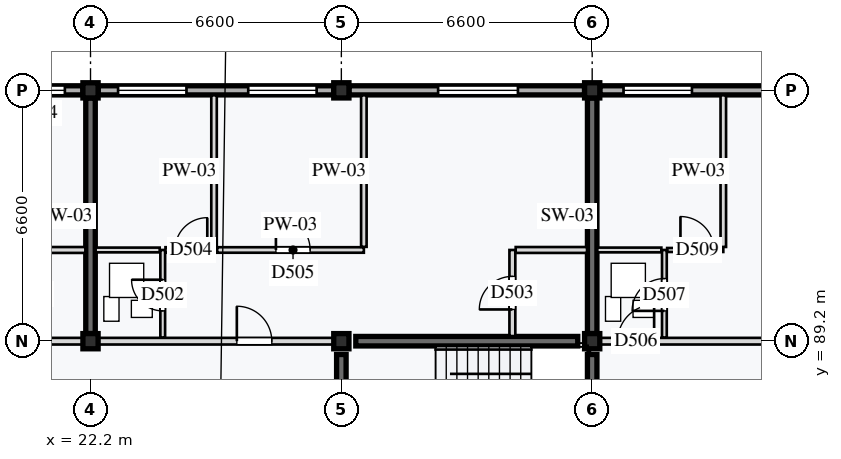
"""IFC4 building model, lengths in metres.
Left out: names, types, materials, properties, quantities, classifications, styles, units other than length and angle.
Written with IfcOpenShell. Run it as: python <this file> out.ifc"""

import sys

from ifc_helpers import new_model, si_unit, direction, frame, frame_2d, origin, origin_2d, place, context, subcontext, project, spatial, rectangle, extrude, element, fill, save


model = new_model("IFC4")
c1 = context("Model", 3, precision=1e-05, world=origin(), true_north=direction((0.0, 1.0)))
c2 = subcontext(c1, "Body", "Model", "MODEL_VIEW")
j1 = project(units=[si_unit("LENGTHUNIT", "METRE"), si_unit("PLANEANGLEUNIT", "RADIAN")], contexts=[c1])
p1 = place(None, origin())
s1 = spatial("IfcSite", under=j1, at=p1, CompositionType="ELEMENT")
p2 = place(p1, origin())
s2 = spatial("IfcBuilding", under=s1, at=p2, CompositionType="ELEMENT")
p3 = place(p2, frame((0.0, 0.0, 50.0)))
s3 = spatial("IfcBuildingStorey", under=s2, at=p3, CompositionType="ELEMENT", Elevation=50.0)
for number, where, z_axis, x_axis in (
    (1, (22.2, 89.2, 0.0), (0.0, 0.0, 1.0), (1.0, 0.0, 0.0)),
    (2, (22.2, 95.8, 0.0), (0.0, 0.0, 1.0), (1.0, 0.0, 0.0)),
    (3, (28.8, 89.2, 0.0), (0.0, 0.0, 1.0), (1.0, 0.0, 0.0)),
    (4, (28.8, 95.8, 0.0), (0.0, 0.0, 1.0), (1.0, 0.0, 0.0)),
    (5, (35.4, 89.2, 0.0), (0.0, 0.0, 1.0), (1.0, 0.0, 0.0)),
    (6, (35.4, 95.8, 0.0), (0.0, 0.0, 1.0), (1.0, 0.0, 0.0)),
):
    element("IfcColumn", number, at=place(p3, frame(where, z_axis=z_axis, x_axis=x_axis)), inside=s3, PredefinedType="COLUMN", context=c2, shape_type="SweptSolid", body=[
        extrude(rectangle(XDim=0.4, YDim=0.4, at=origin_2d()), origin(), (0.0, 0.0, 1.0), 3.2),
    ])
p4 = place(p3, frame((29.18, 89.2, 0.0), z_axis=(0.0, 0.0, 1.0), x_axis=(1.0, 0.0, 0.0)))
e7 = element("IfcWall", 7, at=p4, inside=s3, PredefinedType="SHEAR", context=c2, shape_type="SweptSolid", body=[
    extrude(rectangle(XDim=5.84, YDim=0.25, at=frame_2d((2.92, 0.0))), origin(), (0.0, 0.0, 1.0), 2.98),
])
for number, where, z_axis, x_axis in (
    (8, (28.8, 86.05, 0.0), (0.0, 0.0, 1.0), (0.0, 1.0, 0.0)),
    (9, (35.4, 86.05, 0.0), (0.0, 0.0, 1.0), (0.0, 1.0, 0.0)),
):
    element("IfcWall", number, at=place(p3, frame(where, z_axis=z_axis, x_axis=x_axis)), inside=s3, PredefinedType="SHEAR", context=c2, shape_type="SweptSolid", body=[
        extrude(rectangle(XDim=2.8, YDim=0.25, at=frame_2d((1.4, 0.0))), origin(), (0.0, 0.0, 1.0), 2.98),
    ])
for number, where, z_axis, x_axis in (
    (10, (22.2, 89.4, 0.0), (0.0, 0.0, 1.0), (0.0, 1.0, 0.0)),
    (11, (35.4, 89.4, 0.0), (0.0, 0.0, 1.0), (0.0, 1.0, 0.0)),
):
    element("IfcWall", number, at=place(p3, frame(where, z_axis=z_axis, x_axis=x_axis)), inside=s3, PredefinedType="SHEAR", context=c2, shape_type="SweptSolid", body=[
        extrude(rectangle(XDim=6.2, YDim=0.25, at=frame_2d((3.1, 0.0))), origin(), (0.0, 0.0, 1.0), 2.98),
    ])
p5 = place(p3, frame((15.8, 95.8, 0.0), z_axis=(0.0, 0.0, 1.0), x_axis=(1.0, 0.0, 0.0)))
e12 = element("IfcWall", 12, at=p5, inside=s3, PredefinedType="STANDARD", context=c2, shape_type="SweptSolid", body=[
    extrude(rectangle(XDim=6.2, YDim=0.24, at=frame_2d((3.1, 0.0))), origin(), (0.0, 0.0, 1.0), 2.6),
])
p6 = place(p5, frame((0.625, 0.0, 0.85)))
e13 = element("IfcOpeningElement", 13, at=p6, cuts=e12, PredefinedType="OPENING", context=c2, shape_type="SweptSolid", body=[
    extrude(rectangle(XDim=1.8, YDim=1.35, at=frame_2d((0.9, 0.675))), frame((0.0, 0.13, 0.0), z_axis=(0.0, -1.0, 0.0), x_axis=(1.0, 0.0, 0.0)), (0.0, 0.0, 1.0), 0.26),
])
p7 = place(p5, frame((3.925, 0.0, 0.85)))
e14 = element("IfcOpeningElement", 14, at=p7, cuts=e12, PredefinedType="OPENING", context=c2, shape_type="SweptSolid", body=[
    extrude(rectangle(XDim=1.8, YDim=1.55, at=frame_2d((0.9, 0.775))), frame((0.0, 0.13, 0.0), z_axis=(0.0, -1.0, 0.0), x_axis=(1.0, 0.0, 0.0)), (0.0, 0.0, 1.0), 0.26),
])
p8 = place(p3, frame((22.4, 95.8, 0.0), z_axis=(0.0, 0.0, 1.0), x_axis=(1.0, 0.0, 0.0)))
e15 = element("IfcWall", 15, at=p8, inside=s3, PredefinedType="STANDARD", context=c2, shape_type="SweptSolid", body=[
    extrude(rectangle(XDim=6.2, YDim=0.24, at=frame_2d((3.1, 0.0))), origin(), (0.0, 0.0, 1.0), 2.6),
])
p9 = place(p8, frame((0.525, 0.0, 0.85)))
e16 = element("IfcOpeningElement", 16, at=p9, cuts=e15, PredefinedType="OPENING", context=c2, shape_type="SweptSolid", body=[
    extrude(rectangle(XDim=1.8, YDim=1.35, at=frame_2d((0.9, 0.675))), frame((0.0, 0.13, 0.0), z_axis=(0.0, -1.0, 0.0), x_axis=(1.0, 0.0, 0.0)), (0.0, 0.0, 1.0), 0.26),
])
p10 = place(p8, frame((3.95, 0.0, 0.85)))
e17 = element("IfcOpeningElement", 17, at=p10, cuts=e15, PredefinedType="OPENING", context=c2, shape_type="SweptSolid", body=[
    extrude(rectangle(XDim=1.8, YDim=1.35, at=frame_2d((0.9, 0.675))), frame((0.0, 0.13, 0.0), z_axis=(0.0, -1.0, 0.0), x_axis=(1.0, 0.0, 0.0)), (0.0, 0.0, 1.0), 0.26),
])
p11 = place(p3, frame((29.0, 95.8, 0.0), z_axis=(0.0, 0.0, 1.0), x_axis=(1.0, 0.0, 0.0)))
e18 = element("IfcWall", 18, at=p11, inside=s3, PredefinedType="STANDARD", context=c2, shape_type="SweptSolid", body=[
    extrude(rectangle(XDim=6.2, YDim=0.24, at=frame_2d((3.1, 0.0))), origin(), (0.0, 0.0, 1.0), 2.6),
])
p12 = place(p11, frame((2.346, 0.0, 0.85)))
e19 = element("IfcOpeningElement", 19, at=p12, cuts=e18, PredefinedType="OPENING", context=c2, shape_type="SweptSolid", body=[
    extrude(rectangle(XDim=2.1, YDim=1.55, at=frame_2d((1.05, 0.775))), frame((0.0, 0.13, 0.0), z_axis=(0.0, -1.0, 0.0), x_axis=(1.0, 0.0, 0.0)), (0.0, 0.0, 1.0), 0.26),
])
p13 = place(p3, frame((35.6, 95.8, 0.0), z_axis=(0.0, 0.0, 1.0), x_axis=(1.0, 0.0, 0.0)))
e20 = element("IfcWall", 20, at=p13, inside=s3, PredefinedType="STANDARD", context=c2, shape_type="SweptSolid", body=[
    extrude(rectangle(XDim=6.2, YDim=0.24, at=frame_2d((3.1, 0.0))), origin(), (0.0, 0.0, 1.0), 2.6),
])
p14 = place(p13, frame((0.625, 0.0, 0.85)))
e21 = element("IfcOpeningElement", 21, at=p14, cuts=e20, PredefinedType="OPENING", context=c2, shape_type="SweptSolid", body=[
    extrude(rectangle(XDim=1.8, YDim=1.35, at=frame_2d((0.9, 0.675))), frame((0.0, 0.13, 0.0), z_axis=(0.0, -1.0, 0.0), x_axis=(1.0, 0.0, 0.0)), (0.0, 0.0, 1.0), 0.26),
])
p15 = place(p3, frame((19.2, 89.2, 0.0), z_axis=(0.0, 0.0, 1.0), x_axis=(1.0, 0.0, 0.0)))
e22 = element("IfcWall", 22, at=p15, inside=s3, PredefinedType="PARTITIONING", context=c2, shape_type="SweptSolid", body=[
    extrude(rectangle(XDim=3.0, YDim=0.175, at=frame_2d((1.5, 0.0))), origin(), (0.0, 0.0, 1.0), 2.55),
])
p16 = place(p15, frame((0.22, 0.0, 0.0)))
e23 = element("IfcOpeningElement", 23, at=p16, cuts=e22, PredefinedType="OPENING", context=c2, shape_type="SweptSolid", body=[
    extrude(rectangle(XDim=0.92, YDim=2.14, at=frame_2d((0.46, 1.07))), frame((0.0, 0.097, 0.0), z_axis=(0.0, -1.0, 0.0), x_axis=(1.0, 0.0, 0.0)), (0.0, 0.0, 1.0), 0.195),
])
p17 = place(p3, frame((20.688, 91.6, 0.0), z_axis=(0.0, 0.0, 1.0), x_axis=(1.0, 0.0, 0.0)))
e24 = element("IfcWall", 24, at=p17, inside=s3, PredefinedType="PARTITIONING", context=c2, shape_type="SweptSolid", body=[
    extrude(rectangle(XDim=1.377, YDim=0.155, at=frame_2d((0.689, 0.0))), origin(), (0.0, 0.0, 1.0), 2.98),
])
p18 = place(p3, frame((22.2, 89.2, 0.0), z_axis=(0.0, 0.0, 1.0), x_axis=(1.0, 0.0, 0.0)))
e25 = element("IfcWall", 25, at=p18, inside=s3, PredefinedType="PARTITIONING", context=c2, shape_type="SweptSolid", body=[
    extrude(rectangle(XDim=6.6, YDim=0.175, at=frame_2d((3.3, 0.0))), origin(), (0.0, 0.0, 1.0), 2.55),
])
p19 = place(p18, frame((3.85, 0.0, 0.0)))
e26 = element("IfcOpeningElement", 26, at=p19, cuts=e25, PredefinedType="OPENING", context=c2, shape_type="SweptSolid", body=[
    extrude(rectangle(XDim=0.92, YDim=2.14, at=frame_2d((0.46, 1.07))), frame((0.0, 0.097, 0.0), z_axis=(0.0, -1.0, 0.0), x_axis=(1.0, 0.0, 0.0)), (0.0, 0.0, 1.0), 0.195),
])
p20 = place(p3, frame((24.1, 89.298, 0.0), z_axis=(0.0, 0.0, 1.0), x_axis=(0.0, 1.0, 0.0)))
e27 = element("IfcWall", 27, at=p20, inside=s3, PredefinedType="PARTITIONING", context=c2, shape_type="SweptSolid", body=[
    extrude(rectangle(XDim=2.302, YDim=0.125, at=frame_2d((1.151, 0.0))), origin(), (0.0, 0.0, 1.0), 2.98),
])
p21 = place(p20, frame((0.7, 0.0, 0.0)))
e28 = element("IfcOpeningElement", 28, at=p21, cuts=e27, PredefinedType="OPENING", context=c2, shape_type="SweptSolid", body=[
    extrude(rectangle(XDim=0.82, YDim=2.05, at=frame_2d((0.41, 1.025))), frame((0.0, 0.073, 0.0), z_axis=(0.0, -1.0, 0.0), x_axis=(1.0, 0.0, 0.0)), (0.0, 0.0, 1.0), 0.145),
])
p22 = place(p3, frame((22.335, 91.6, 0.0), z_axis=(0.0, 0.0, 1.0), x_axis=(1.0, 0.0, 0.0)))
e29 = element("IfcWall", 29, at=p22, inside=s3, PredefinedType="PARTITIONING", context=c2, shape_type="SweptSolid", body=[
    extrude(rectangle(XDim=1.685, YDim=0.125, at=frame_2d((0.843, 0.0))), origin(), (0.0, 0.0, 1.0), 2.98),
])
p23 = place(p3, frame((33.3, 89.335, 0.0), z_axis=(0.0, 0.0, 1.0), x_axis=(0.0, 1.0, 0.0)))
e30 = element("IfcWall", 30, at=p23, inside=s3, PredefinedType="PARTITIONING", context=c2, shape_type="SweptSolid", body=[
    extrude(rectangle(XDim=2.265, YDim=0.155, at=frame_2d((1.133, 0.0))), origin(), (0.0, 0.0, 1.0), 2.98),
])
p24 = place(p23, frame((0.7, 0.0, 0.0)))
e31 = element("IfcOpeningElement", 31, at=p24, cuts=e30, PredefinedType="OPENING", context=c2, shape_type="SweptSolid", body=[
    extrude(rectangle(XDim=0.87, YDim=2.08, at=frame_2d((0.435, 1.04))), frame((0.0, 0.087, 0.0), z_axis=(0.0, -1.0, 0.0), x_axis=(1.0, 0.0, 0.0)), (0.0, 0.0, 1.0), 0.175),
])
p25 = place(p3, frame((33.387, 91.6, 0.0), z_axis=(0.0, 0.0, 1.0), x_axis=(1.0, 0.0, 0.0)))
e32 = element("IfcWall", 32, at=p25, inside=s3, PredefinedType="PARTITIONING", context=c2, shape_type="SweptSolid", body=[
    extrude(rectangle(XDim=1.877, YDim=0.155, at=frame_2d((0.939, 0.0))), origin(), (0.0, 0.0, 1.0), 2.98),
])
p26 = place(p3, frame((24.173, 91.6, 0.0), z_axis=(0.0, 0.0, 1.0), x_axis=(1.0, 0.0, 0.0)))
e33 = element("IfcWall", 33, at=p26, inside=s3, PredefinedType="PARTITIONING", context=c2, shape_type="SweptSolid", body=[
    extrude(rectangle(XDim=1.277, YDim=0.145, at=frame_2d((0.639, 0.0))), origin(), (0.0, 0.0, 1.0), 2.98),
])
p27 = place(p26, frame((0.25, 0.0, 0.0)))
e34 = element("IfcOpeningElement", 34, at=p27, cuts=e33, PredefinedType="OPENING", context=c2, shape_type="SweptSolid", body=[
    extrude(rectangle(XDim=0.85, YDim=2.1, at=frame_2d((0.425, 1.05))), frame((0.0, 0.083, 0.0), z_axis=(0.0, -1.0, 0.0), x_axis=(1.0, 0.0, 0.0)), (0.0, 0.0, 1.0), 0.165),
])
p28 = place(p3, frame((25.45, 91.683, 0.0), z_axis=(0.0, 0.0, 1.0), x_axis=(0.0, 1.0, 0.0)))
e35 = element("IfcWall", 35, at=p28, inside=s3, PredefinedType="PARTITIONING", context=c2, shape_type="SweptSolid", body=[
    extrude(rectangle(XDim=3.987, YDim=0.145, at=frame_2d((1.994, 0.0))), origin(), (0.0, 0.0, 1.0), 2.98),
])
p29 = place(p3, frame((25.532, 91.6, 0.0), z_axis=(0.0, 0.0, 1.0), x_axis=(1.0, 0.0, 0.0)))
e36 = element("IfcWall", 36, at=p29, inside=s3, PredefinedType="PARTITIONING", context=c2, shape_type="SweptSolid", body=[
    extrude(rectangle(XDim=3.86, YDim=0.145, at=frame_2d((1.93, 0.0))), origin(), (0.0, 0.0, 1.0), 2.98),
])
p30 = place(p29, frame((1.546, 0.0, 0.0)))
e37 = element("IfcOpeningElement", 37, at=p30, cuts=e36, PredefinedType="OPENING", context=c2, shape_type="SweptSolid", body=[
    extrude(rectangle(XDim=0.9, YDim=2.1, at=frame_2d((0.45, 1.05))), frame((0.0, 0.083, 0.0), z_axis=(0.0, -1.0, 0.0), x_axis=(1.0, 0.0, 0.0)), (0.0, 0.0, 1.0), 0.165),
])
p31 = place(p3, frame((29.392, 91.683, 0.0), z_axis=(0.0, 0.0, 1.0), x_axis=(0.0, 1.0, 0.0)))
e38 = element("IfcWall", 38, at=p31, inside=s3, PredefinedType="PARTITIONING", context=c2, shape_type="SweptSolid", body=[
    extrude(rectangle(XDim=3.987, YDim=0.145, at=frame_2d((1.994, 0.0))), origin(), (0.0, 0.0, 1.0), 2.98),
])
p32 = place(p3, frame((35.4, 89.2, 0.0), z_axis=(0.0, 0.0, 1.0), x_axis=(1.0, 0.0, 0.0)))
e39 = element("IfcWall", 39, at=p32, inside=s3, PredefinedType="PARTITIONING", context=c2, shape_type="SweptSolid", body=[
    extrude(rectangle(XDim=13.2, YDim=0.175, at=frame_2d((6.6, 0.0))), origin(), (0.0, 0.0, 1.0), 2.55),
])
p33 = place(p32, frame((0.67, 0.0, 0.0)))
e40 = element("IfcOpeningElement", 40, at=p33, cuts=e39, PredefinedType="OPENING", context=c2, shape_type="SweptSolid", body=[
    extrude(rectangle(XDim=0.96, YDim=2.18, at=frame_2d((0.48, 1.09))), frame((0.0, 0.097, 0.0), z_axis=(0.0, -1.0, 0.0), x_axis=(1.0, 0.0, 0.0)), (0.0, 0.0, 1.0), 0.195),
])
p34 = place(p3, frame((37.3, 89.298, 0.0), z_axis=(0.0, 0.0, 1.0), x_axis=(0.0, 1.0, 0.0)))
e41 = element("IfcWall", 41, at=p34, inside=s3, PredefinedType="PARTITIONING", context=c2, shape_type="SweptSolid", body=[
    extrude(rectangle(XDim=2.302, YDim=0.125, at=frame_2d((1.151, 0.0))), origin(), (0.0, 0.0, 1.0), 2.98),
])
p35 = place(p34, frame((0.7, 0.0, 0.0)))
e42 = element("IfcOpeningElement", 42, at=p35, cuts=e41, PredefinedType="OPENING", context=c2, shape_type="SweptSolid", body=[
    extrude(rectangle(XDim=0.85, YDim=2.04, at=frame_2d((0.425, 1.02))), frame((0.0, 0.073, 0.0), z_axis=(0.0, -1.0, 0.0), x_axis=(1.0, 0.0, 0.0)), (0.0, 0.0, 1.0), 0.145),
])
p36 = place(p3, frame((35.535, 91.6, 0.0), z_axis=(0.0, 0.0, 1.0), x_axis=(1.0, 0.0, 0.0)))
e43 = element("IfcWall", 43, at=p36, inside=s3, PredefinedType="PARTITIONING", context=c2, shape_type="SweptSolid", body=[
    extrude(rectangle(XDim=1.685, YDim=0.125, at=frame_2d((0.843, 0.0))), origin(), (0.0, 0.0, 1.0), 2.98),
])
p37 = place(p3, frame((37.373, 91.6, 0.0), z_axis=(0.0, 0.0, 1.0), x_axis=(1.0, 0.0, 0.0)))
e44 = element("IfcWall", 44, at=p37, inside=s3, PredefinedType="PARTITIONING", context=c2, shape_type="SweptSolid", body=[
    extrude(rectangle(XDim=1.478, YDim=0.105, at=frame_2d((0.739, 0.0))), origin(), (0.0, 0.0, 1.0), 2.98),
])
p38 = place(p37, frame((0.35, 0.0, 0.0)))
e45 = element("IfcOpeningElement", 45, at=p38, cuts=e44, PredefinedType="OPENING", context=c2, shape_type="SweptSolid", body=[
    extrude(rectangle(XDim=0.88, YDim=2.16, at=frame_2d((0.44, 1.08))), frame((0.0, 0.062, 0.0), z_axis=(0.0, -1.0, 0.0), x_axis=(1.0, 0.0, 0.0)), (0.0, 0.0, 1.0), 0.125),
])
p39 = place(p3, frame((38.85, 91.68, 0.0), z_axis=(0.0, 0.0, 1.0), x_axis=(0.0, 1.0, 0.0)))
e46 = element("IfcWall", 46, at=p39, inside=s3, PredefinedType="PARTITIONING", context=c2, shape_type="SweptSolid", body=[
    extrude(rectangle(XDim=3.99, YDim=0.145, at=frame_2d((1.995, 0.0))), origin(), (0.0, 0.0, 1.0), 2.98),
])
p40 = place(p7, origin())
e47 = element("IfcWindow", 47, at=p40, inside=s3, PartitioningType="SINGLE_PANEL", PredefinedType="WINDOW", context=c2, shape_type="SweptSolid", body=[
    extrude(rectangle(XDim=1.8, YDim=1.55, at=frame_2d((0.9, 0.775))), frame((0.0, 0.03, 0.0), z_axis=(0.0, -1.0, 0.0), x_axis=(1.0, 0.0, 0.0)), (0.0, 0.0, 1.0), 0.06),
])
fill(e14, e47)
p41 = place(p9, origin())
e48 = element("IfcWindow", 48, at=p41, inside=s3, PartitioningType="SINGLE_PANEL", PredefinedType="WINDOW", context=c2, shape_type="SweptSolid", body=[
    extrude(rectangle(XDim=1.8, YDim=1.35, at=frame_2d((0.9, 0.675))), frame((0.0, 0.03, 0.0), z_axis=(0.0, -1.0, 0.0), x_axis=(1.0, 0.0, 0.0)), (0.0, 0.0, 1.0), 0.06),
])
fill(e16, e48)
p42 = place(p10, origin())
e49 = element("IfcWindow", 49, at=p42, inside=s3, PartitioningType="SINGLE_PANEL", PredefinedType="WINDOW", context=c2, shape_type="SweptSolid", body=[
    extrude(rectangle(XDim=1.8, YDim=1.35, at=frame_2d((0.9, 0.675))), frame((0.0, 0.03, 0.0), z_axis=(0.0, -1.0, 0.0), x_axis=(1.0, 0.0, 0.0)), (0.0, 0.0, 1.0), 0.06),
])
fill(e17, e49)
p43 = place(p12, origin())
e50 = element("IfcWindow", 50, at=p43, inside=s3, PartitioningType="SINGLE_PANEL", PredefinedType="WINDOW", context=c2, shape_type="SweptSolid", body=[
    extrude(rectangle(XDim=2.1, YDim=1.55, at=frame_2d((1.05, 0.775))), frame((0.0, 0.03, 0.0), z_axis=(0.0, -1.0, 0.0), x_axis=(1.0, 0.0, 0.0)), (0.0, 0.0, 1.0), 0.06),
])
fill(e19, e50)
p44 = place(p14, origin())
e51 = element("IfcWindow", 51, at=p44, inside=s3, PartitioningType="SINGLE_PANEL", PredefinedType="WINDOW", context=c2, shape_type="SweptSolid", body=[
    extrude(rectangle(XDim=1.8, YDim=1.35, at=frame_2d((0.9, 0.675))), frame((0.0, 0.03, 0.0), z_axis=(0.0, -1.0, 0.0), x_axis=(1.0, 0.0, 0.0)), (0.0, 0.0, 1.0), 0.06),
])
fill(e21, e51)
p45 = place(p19, origin())
e52 = element("IfcDoor", 52, at=p45, inside=s3, OperationType="SINGLE_SWING_LEFT", PredefinedType="DOOR", context=c2, shape_type="SweptSolid", body=[
    extrude(rectangle(XDim=0.92, YDim=2.14, at=frame_2d((0.46, 1.07))), frame((0.0, 0.025, 0.0), z_axis=(0.0, -1.0, 0.0), x_axis=(1.0, 0.0, 0.0)), (0.0, 0.0, 1.0), 0.05),
])
fill(e26, e52)
p46 = place(p21, origin())
e53 = element("IfcDoor", 53, at=p46, inside=s3, OperationType="SINGLE_SWING_RIGHT", PredefinedType="DOOR", context=c2, shape_type="SweptSolid", body=[
    extrude(rectangle(XDim=0.82, YDim=2.05, at=frame_2d((0.41, 1.025))), frame((0.0, 0.025, 0.0), z_axis=(0.0, -1.0, 0.0), x_axis=(1.0, 0.0, 0.0)), (0.0, 0.0, 1.0), 0.05),
])
fill(e28, e53)
p47 = place(p24, origin())
e54 = element("IfcDoor", 54, at=p47, inside=s3, OperationType="SINGLE_SWING_LEFT", PredefinedType="DOOR", context=c2, shape_type="SweptSolid", body=[
    extrude(rectangle(XDim=0.87, YDim=2.08, at=frame_2d((0.435, 1.04))), frame((0.0, 0.025, 0.0), z_axis=(0.0, -1.0, 0.0), x_axis=(1.0, 0.0, 0.0)), (0.0, 0.0, 1.0), 0.05),
])
fill(e31, e54)
p48 = place(p27, origin())
e55 = element("IfcDoor", 55, at=p48, inside=s3, OperationType="SINGLE_SWING_RIGHT", PredefinedType="DOOR", context=c2, shape_type="SweptSolid", body=[
    extrude(rectangle(XDim=0.85, YDim=2.1, at=frame_2d((0.425, 1.05))), frame((0.0, 0.025, 0.0), z_axis=(0.0, -1.0, 0.0), x_axis=(1.0, 0.0, 0.0)), (0.0, 0.0, 1.0), 0.05),
])
fill(e34, e55)
p49 = place(p30, origin())
e56 = element("IfcDoor", 56, at=p49, inside=s3, OperationType="SINGLE_SWING_LEFT", PredefinedType="DOOR", context=c2, shape_type="SweptSolid", body=[
    extrude(rectangle(XDim=0.9, YDim=2.1, at=frame_2d((0.45, 1.05))), frame((0.0, 0.025, 0.0), z_axis=(0.0, -1.0, 0.0), x_axis=(1.0, 0.0, 0.0)), (0.0, 0.0, 1.0), 0.05),
])
fill(e37, e56)
p50 = place(p33, origin())
e57 = element("IfcDoor", 57, at=p50, inside=s3, OperationType="SINGLE_SWING_RIGHT", PredefinedType="DOOR", context=c2, shape_type="SweptSolid", body=[
    extrude(rectangle(XDim=0.96, YDim=2.18, at=frame_2d((0.48, 1.09))), frame((0.0, 0.025, 0.0), z_axis=(0.0, -1.0, 0.0), x_axis=(1.0, 0.0, 0.0)), (0.0, 0.0, 1.0), 0.05),
])
fill(e40, e57)
p51 = place(p35, origin())
e58 = element("IfcDoor", 58, at=p51, inside=s3, OperationType="SINGLE_SWING_LEFT", PredefinedType="DOOR", context=c2, shape_type="SweptSolid", body=[
    extrude(rectangle(XDim=0.85, YDim=2.04, at=frame_2d((0.425, 1.02))), frame((0.0, 0.025, 0.0), z_axis=(0.0, -1.0, 0.0), x_axis=(1.0, 0.0, 0.0)), (0.0, 0.0, 1.0), 0.05),
])
fill(e42, e58)
p52 = place(p38, origin())
e59 = element("IfcDoor", 59, at=p52, inside=s3, OperationType="SINGLE_SWING_LEFT", PredefinedType="DOOR", context=c2, shape_type="SweptSolid", body=[
    extrude(rectangle(XDim=0.88, YDim=2.16, at=frame_2d((0.44, 1.08))), frame((0.0, 0.025, 0.0), z_axis=(0.0, -1.0, 0.0), x_axis=(1.0, 0.0, 0.0)), (0.0, 0.0, 1.0), 0.05),
])
fill(e45, e59)
save(model, sys.argv[1])
